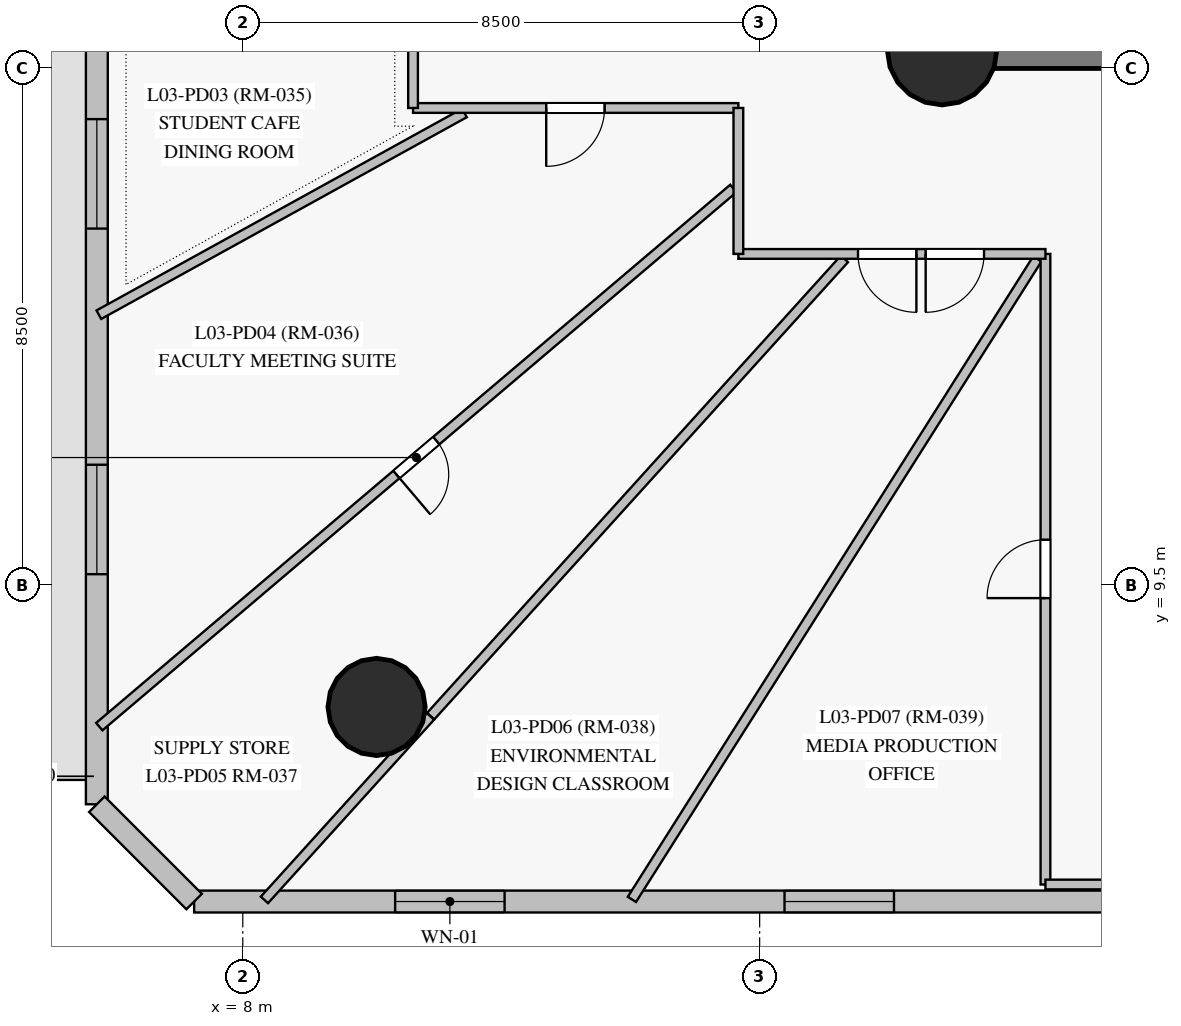
"""IFC4 building model, lengths in metres.
Left out: names, types, materials, properties, quantities, classifications, styles, units other than length and angle.
Written with IfcOpenShell. Run it as: python <this file> out.ifc"""

import sys

from ifc_helpers import new_model, si_unit, direction, frame, frame_2d, origin, origin_with_axes, origin_2d, place, context, subcontext, project, spatial, rectangle, circle, extrude, source, transform, mapped, element, fill, save


model = new_model("IFC4")
c1 = context("Model", 3, precision=1e-05, world=origin(), true_north=direction((0.0, 1.0)))
c2 = subcontext(c1, "Body", "Model", "MODEL_VIEW")
j1 = project(units=[si_unit("LENGTHUNIT", "METRE"), si_unit("PLANEANGLEUNIT", "RADIAN")], contexts=[c1])
p1 = place(None, origin())
s1 = spatial("IfcSite", under=j1, at=p1, CompositionType="ELEMENT")
p2 = place(p1, origin())
s2 = spatial("IfcBuilding", under=s1, at=p2, CompositionType="ELEMENT")
p3 = place(p2, frame((0.0, 0.0, 13.5)))
s3 = spatial("IfcBuildingStorey", under=s2, at=p3, CompositionType="ELEMENT", Elevation=13.5)
p4 = place(p3, frame((19.5, 18.3, 0.0), z_axis=(0.0, 0.0, 1.0), x_axis=(1.0, 0.0, 0.0)))
e1 = element("IfcWall", 1, at=p4, inside=s3, PredefinedType="SHEAR", context=c2, shape_type="SweptSolid", body=[
    extrude(rectangle(XDim=7.05, YDim=0.6, at=frame_2d((3.525, 0.0))), origin(), (0.0, 0.0, 1.0), 4.225),
])
p5 = place(p4, frame((4.2, 0.0, 0.0)))
e2 = element("IfcOpeningElement", 2, at=p5, cuts=e1, PredefinedType="OPENING", context=c2, shape_type="SweptSolid", body=[
    extrude(rectangle(XDim=1.4, YDim=2.2, at=frame_2d((0.7, 1.1))), frame((0.0, 0.31, 0.0), z_axis=(0.0, -1.0, 0.0), x_axis=(1.0, 0.0, 0.0)), (0.0, 0.0, 1.0), 0.62),
])
m1 = source(origin_with_axes(), c2, "Body", "SweptSolid", [
    extrude(circle(Radius=0.9, at=origin_2d()), origin(), (0.0, 0.0, 1.0), 4.5),
])
p6 = place(p3, frame((19.5, 18.3, 0.0), z_axis=(0.0, 0.0, 1.0), x_axis=(1.0, 0.0, 0.0)))
e3 = element("IfcColumn", 3, at=p6, inside=s3, PredefinedType="COLUMN", context=c2, shape_type="MappedRepresentation", body=[
    mapped(m1, transform((0.0, 0.0, 0.0), scale=1.0)),
])
m2 = source(origin_with_axes(), c2, "Body", "SweptSolid", [
    extrude(circle(Radius=0.8, at=origin_2d()), origin(), (0.0, 0.0, 1.0), 4.5),
])
p7 = place(p3, frame((10.2, 7.5, 0.0), z_axis=(0.0, 0.0, 1.0), x_axis=(1.0, 0.0, 0.0)))
e4 = element("IfcColumn", 4, at=p7, inside=s3, PredefinedType="COLUMN", context=c2, shape_type="MappedRepresentation", body=[
    mapped(m2, transform((0.0, 0.0, 0.0), scale=1.0)),
])
p8 = place(p3, frame((7.2, 4.3, 0.0), z_axis=(0.0, 0.0, 1.0), x_axis=(1.0, 0.0, 0.0)))
e5 = element("IfcWall", 5, at=p8, inside=s3, PredefinedType="SOLIDWALL", context=c2, shape_type="SweptSolid", body=[
    extrude(rectangle(XDim=46.8, YDim=0.36, at=frame_2d((23.4, 0.0))), origin(), (0.0, 0.0, 1.0), 4.225),
])
p9 = place(p8, frame((3.305, 0.0, 0.85)))
e6 = element("IfcOpeningElement", 6, at=p9, cuts=e5, PredefinedType="OPENING", context=c2, shape_type="SweptSolid", body=[
    extrude(rectangle(XDim=1.8, YDim=2.2, at=frame_2d((0.9, 1.1))), frame((0.0, 0.19, 0.0), z_axis=(0.0, -1.0, 0.0), x_axis=(1.0, 0.0, 0.0)), (0.0, 0.0, 1.0), 0.38),
])
p10 = place(p8, frame((9.709, 0.0, 0.85)))
e7 = element("IfcOpeningElement", 7, at=p10, cuts=e5, PredefinedType="OPENING", context=c2, shape_type="SweptSolid", body=[
    extrude(rectangle(XDim=1.8, YDim=2.2, at=frame_2d((0.9, 1.1))), frame((0.0, 0.19, 0.0), z_axis=(0.0, -1.0, 0.0), x_axis=(1.0, 0.0, 0.0)), (0.0, 0.0, 1.0), 0.38),
])
p11 = place(p8, frame((15.2, 0.0, 0.85)))
e8 = element("IfcOpeningElement", 8, at=p11, cuts=e5, PredefinedType="OPENING", context=c2, shape_type="SweptSolid", body=[
    extrude(rectangle(XDim=1.8, YDim=2.2, at=frame_2d((0.9, 1.1))), frame((0.0, 0.19, 0.0), z_axis=(0.0, -1.0, 0.0), x_axis=(1.0, 0.0, 0.0)), (0.0, 0.0, 1.0), 0.38),
])
p12 = place(p8, frame((18.865, 0.0, 0.85)))
e9 = element("IfcOpeningElement", 9, at=p12, cuts=e5, PredefinedType="OPENING", context=c2, shape_type="SweptSolid", body=[
    extrude(rectangle(XDim=1.8, YDim=2.2, at=frame_2d((0.9, 1.1))), frame((0.0, 0.19, 0.0), z_axis=(0.0, -1.0, 0.0), x_axis=(1.0, 0.0, 0.0)), (0.0, 0.0, 1.0), 0.38),
])
p13 = place(p8, frame((22.433, 0.0, 0.85)))
e10 = element("IfcOpeningElement", 10, at=p13, cuts=e5, PredefinedType="OPENING", context=c2, shape_type="SweptSolid", body=[
    extrude(rectangle(XDim=1.8, YDim=2.2, at=frame_2d((0.9, 1.1))), frame((0.0, 0.19, 0.0), z_axis=(0.0, -1.0, 0.0), x_axis=(1.0, 0.0, 0.0)), (0.0, 0.0, 1.0), 0.38),
])
p14 = place(p8, frame((28.606, 0.0, 0.85)))
e11 = element("IfcOpeningElement", 11, at=p14, cuts=e5, PredefinedType="OPENING", context=c2, shape_type="SweptSolid", body=[
    extrude(rectangle(XDim=1.8, YDim=2.2, at=frame_2d((0.9, 1.1))), frame((0.0, 0.19, 0.0), z_axis=(0.0, -1.0, 0.0), x_axis=(1.0, 0.0, 0.0)), (0.0, 0.0, 1.0), 0.38),
])
p15 = place(p8, frame((32.533, 0.0, 0.85)))
e12 = element("IfcOpeningElement", 12, at=p15, cuts=e5, PredefinedType="OPENING", context=c2, shape_type="SweptSolid", body=[
    extrude(rectangle(XDim=1.8, YDim=2.2, at=frame_2d((0.9, 1.1))), frame((0.0, 0.19, 0.0), z_axis=(0.0, -1.0, 0.0), x_axis=(1.0, 0.0, 0.0)), (0.0, 0.0, 1.0), 0.38),
])
p16 = place(p8, frame((36.31, 0.0, 0.85)))
e13 = element("IfcOpeningElement", 13, at=p16, cuts=e5, PredefinedType="OPENING", context=c2, shape_type="SweptSolid", body=[
    extrude(rectangle(XDim=1.8, YDim=2.2, at=frame_2d((0.9, 1.1))), frame((0.0, 0.19, 0.0), z_axis=(0.0, -1.0, 0.0), x_axis=(1.0, 0.0, 0.0)), (0.0, 0.0, 1.0), 0.38),
])
p17 = place(p8, frame((43.283, 0.0, 0.85)))
e14 = element("IfcOpeningElement", 14, at=p17, cuts=e5, PredefinedType="OPENING", context=c2, shape_type="SweptSolid", body=[
    extrude(rectangle(XDim=1.8, YDim=2.2, at=frame_2d((0.9, 1.1))), frame((0.0, 0.19, 0.0), z_axis=(0.0, -1.0, 0.0), x_axis=(1.0, 0.0, 0.0)), (0.0, 0.0, 1.0), 0.38),
])
p18 = place(p3, frame((5.6, 47.1, 0.0), z_axis=(0.0, 0.0, 1.0), x_axis=(0.0, -1.0, 0.0)))
e15 = element("IfcWall", 15, at=p18, inside=s3, PredefinedType="SOLIDWALL", context=c2, shape_type="SweptSolid", body=[
    extrude(rectangle(XDim=41.2, YDim=0.36, at=frame_2d((20.6, 0.0))), origin(), (0.0, 0.0, 1.0), 4.225),
])
p19 = place(p18, frame((1.008, 0.0, 0.85)))
e16 = element("IfcOpeningElement", 16, at=p19, cuts=e15, PredefinedType="OPENING", context=c2, shape_type="SweptSolid", body=[
    extrude(rectangle(XDim=1.8, YDim=2.2, at=frame_2d((0.9, 1.1))), frame((0.0, 0.19, 0.0), z_axis=(0.0, -1.0, 0.0), x_axis=(1.0, 0.0, 0.0)), (0.0, 0.0, 1.0), 0.38),
])
p20 = place(p18, frame((4.773, 0.0, 0.85)))
e17 = element("IfcOpeningElement", 17, at=p20, cuts=e15, PredefinedType="OPENING", context=c2, shape_type="SweptSolid", body=[
    extrude(rectangle(XDim=1.8, YDim=2.2, at=frame_2d((0.9, 1.1))), frame((0.0, 0.19, 0.0), z_axis=(0.0, -1.0, 0.0), x_axis=(1.0, 0.0, 0.0)), (0.0, 0.0, 1.0), 0.38),
])
p21 = place(p18, frame((8.381, 0.0, 0.85)))
e18 = element("IfcOpeningElement", 18, at=p21, cuts=e15, PredefinedType="OPENING", context=c2, shape_type="SweptSolid", body=[
    extrude(rectangle(XDim=1.8, YDim=2.2, at=frame_2d((0.9, 1.1))), frame((0.0, 0.19, 0.0), z_axis=(0.0, -1.0, 0.0), x_axis=(1.0, 0.0, 0.0)), (0.0, 0.0, 1.0), 0.38),
])
p22 = place(p18, frame((19.996, 0.0, 0.85)))
e19 = element("IfcOpeningElement", 19, at=p22, cuts=e15, PredefinedType="OPENING", context=c2, shape_type="SweptSolid", body=[
    extrude(rectangle(XDim=1.8, YDim=2.2, at=frame_2d((0.9, 1.1))), frame((0.0, 0.19, 0.0), z_axis=(0.0, -1.0, 0.0), x_axis=(1.0, 0.0, 0.0)), (0.0, 0.0, 1.0), 0.38),
])
p23 = place(p18, frame((25.14, 0.0, 0.85)))
e20 = element("IfcOpeningElement", 20, at=p23, cuts=e15, PredefinedType="OPENING", context=c2, shape_type="SweptSolid", body=[
    extrude(rectangle(XDim=1.8, YDim=2.2, at=frame_2d((0.9, 1.1))), frame((0.0, 0.19, 0.0), z_axis=(0.0, -1.0, 0.0), x_axis=(1.0, 0.0, 0.0)), (0.0, 0.0, 1.0), 0.38),
])
p24 = place(p18, frame((29.933, 0.0, 0.85)))
e21 = element("IfcOpeningElement", 21, at=p24, cuts=e15, PredefinedType="OPENING", context=c2, shape_type="SweptSolid", body=[
    extrude(rectangle(XDim=1.8, YDim=2.2, at=frame_2d((0.9, 1.1))), frame((0.0, 0.19, 0.0), z_axis=(0.0, -1.0, 0.0), x_axis=(1.0, 0.0, 0.0)), (0.0, 0.0, 1.0), 0.38),
])
p25 = place(p18, frame((35.617, 0.0, 0.85)))
e22 = element("IfcOpeningElement", 22, at=p25, cuts=e15, PredefinedType="OPENING", context=c2, shape_type="SweptSolid", body=[
    extrude(rectangle(XDim=1.8, YDim=2.2, at=frame_2d((0.9, 1.1))), frame((0.0, 0.19, 0.0), z_axis=(0.0, -1.0, 0.0), x_axis=(1.0, 0.0, 0.0)), (0.0, 0.0, 1.0), 0.38),
])
p26 = place(p18, frame((13.208, 0.0, 0.0)))
e23 = element("IfcOpeningElement", 23, at=p26, cuts=e15, PredefinedType="OPENING", context=c2, shape_type="SweptSolid", body=[
    extrude(rectangle(XDim=1.05, YDim=2.12, at=frame_2d((0.525, 1.06))), frame((0.0, 0.19, 0.0), z_axis=(0.0, -1.0, 0.0), x_axis=(1.0, 0.0, 0.0)), (0.0, 0.0, 1.0), 0.38),
])
p27 = place(p3, frame((5.6, 5.9, 0.0), z_axis=(0.0, 0.0, 1.0), x_axis=(0.707106781187, -0.707106781187, 0.0)))
e24 = element("IfcWall", 24, at=p27, inside=s3, PredefinedType="SOLIDWALL", context=c2, shape_type="SweptSolid", body=[
    extrude(rectangle(XDim=2.262, YDim=0.36, at=frame_2d((1.131, 0.0))), origin(), (0.0, 0.0, 1.0), 4.225),
])
p28 = place(p3, frame((16.068, 16.027, 0.0), z_axis=(0.0, 0.0, 1.0), x_axis=(-0.762407725243, -0.647096948293, 0.0)))
e25 = element("IfcWall", 25, at=p28, inside=s3, PredefinedType="PARTITIONING", context=c2, shape_type="SweptSolid", body=[
    extrude(rectangle(XDim=13.677, YDim=0.16, at=frame_2d((6.839, 0.0))), origin(), (0.0, 0.0, 1.0), 4.225),
])
p29 = place(p28, frame((6.409, 0.0, 0.0)))
e26 = element("IfcOpeningElement", 26, at=p29, cuts=e25, PredefinedType="OPENING", context=c2, shape_type="SweptSolid", body=[
    extrude(rectangle(XDim=0.86, YDim=2.04, at=frame_2d((0.43, 1.02))), frame((0.0, 0.09, 0.0), z_axis=(0.0, -1.0, 0.0), x_axis=(1.0, 0.0, 0.0)), (0.0, 0.0, 1.0), 0.18),
])
p30 = place(p3, frame((21.066, 14.868, 0.0), z_axis=(0.0, 0.0, 1.0), x_axis=(-0.534838659137, -0.844954205086, 0.0)))
e27 = element("IfcWall", 27, at=p30, inside=s3, PredefinedType="PARTITIONING", context=c2, shape_type="SweptSolid", body=[
    extrude(rectangle(XDim=12.465, YDim=0.16, at=frame_2d((6.233, 0.0))), origin(), (0.0, 0.0, 1.0), 4.225),
])
p31 = place(p3, frame((21.2, 4.58, 0.0), z_axis=(0.0, 0.0, 1.0), x_axis=(0.0, 1.0, 0.0)))
e28 = element("IfcWall", 28, at=p31, inside=s3, PredefinedType="PARTITIONING", context=c2, shape_type="SweptSolid", body=[
    extrude(rectangle(XDim=10.37, YDim=0.16, at=frame_2d((5.185, 0.0))), origin(), (0.0, 0.0, 1.0), 4.225),
])
p32 = place(p31, frame((4.71, 0.0, 0.0)))
e29 = element("IfcOpeningElement", 29, at=p32, cuts=e28, PredefinedType="OPENING", context=c2, shape_type="SweptSolid", body=[
    extrude(rectangle(XDim=0.96, YDim=2.15, at=frame_2d((0.48, 1.075))), frame((0.0, 0.09, 0.0), z_axis=(0.0, -1.0, 0.0), x_axis=(1.0, 0.0, 0.0)), (0.0, 0.0, 1.0), 0.18),
])
p33 = place(p3, frame((17.894, 14.868, 0.0), z_axis=(0.0, 0.0, 1.0), x_axis=(-0.670944212542, -0.741507831149, 0.0)))
e30 = element("IfcWall", 30, at=p33, inside=s3, PredefinedType="PARTITIONING", context=c2, shape_type="SweptSolid", body=[
    extrude(rectangle(XDim=10.141, YDim=0.16, at=frame_2d((5.07, 0.0))), origin(), (0.0, 0.0, 1.0), 4.225),
])
p34 = place(p3, frame((11.645, 17.268, 0.0), z_axis=(0.0, 0.0, 1.0), x_axis=(-0.875543975617, -0.483138434365, 0.0)))
e31 = element("IfcWall", 31, at=p34, inside=s3, PredefinedType="PARTITIONING", context=c2, shape_type="SweptSolid", body=[
    extrude(rectangle(XDim=6.867, YDim=0.16, at=frame_2d((3.434, 0.0))), origin(), (0.0, 0.0, 1.0), 4.225),
])
p35 = place(p3, frame((16.15, 17.35, 0.0), z_axis=(0.0, 0.0, 1.0), x_axis=(-1.0, 0.0, 0.0)))
e32 = element("IfcWall", 32, at=p35, inside=s3, PredefinedType="PARTITIONING", context=c2, shape_type="SweptSolid", body=[
    extrude(rectangle(XDim=5.35, YDim=0.16, at=frame_2d((2.675, 0.0))), origin(), (0.0, 0.0, 1.0), 4.225),
])
p36 = place(p35, frame((2.2, 0.0, 0.0)))
e33 = element("IfcOpeningElement", 33, at=p36, cuts=e32, PredefinedType="OPENING", context=c2, shape_type="SweptSolid", body=[
    extrude(rectangle(XDim=0.96, YDim=2.15, at=frame_2d((0.48, 1.075))), frame((0.0, 0.09, 0.0), z_axis=(0.0, -1.0, 0.0), x_axis=(1.0, 0.0, 0.0)), (0.0, 0.0, 1.0), 0.18),
])
p37 = place(p3, frame((21.2, 14.95, 0.0), z_axis=(0.0, 0.0, 1.0), x_axis=(-1.0, 0.0, 0.0)))
e34 = element("IfcWall", 34, at=p37, inside=s3, PredefinedType="PARTITIONING", context=c2, shape_type="SweptSolid", body=[
    extrude(rectangle(XDim=5.05, YDim=0.16, at=frame_2d((2.525, 0.0))), origin(), (0.0, 0.0, 1.0), 4.225),
])
p38 = place(p37, frame((2.123, 0.0, 0.0)))
e35 = element("IfcOpeningElement", 35, at=p38, cuts=e34, PredefinedType="OPENING", context=c2, shape_type="SweptSolid", body=[
    extrude(rectangle(XDim=0.96, YDim=2.15, at=frame_2d((0.48, 1.075))), frame((0.0, 0.09, 0.0), z_axis=(0.0, -1.0, 0.0), x_axis=(1.0, 0.0, 0.0)), (0.0, 0.0, 1.0), 0.18),
])
p39 = place(p37, frame((1.01, 0.0, 0.0)))
e36 = element("IfcOpeningElement", 36, at=p39, cuts=e34, PredefinedType="OPENING", context=c2, shape_type="SweptSolid", body=[
    extrude(rectangle(XDim=0.96, YDim=2.15, at=frame_2d((0.48, 1.075))), frame((0.0, 0.09, 0.0), z_axis=(0.0, -1.0, 0.0), x_axis=(1.0, 0.0, 0.0)), (0.0, 0.0, 1.0), 0.18),
])
p40 = place(p3, frame((25.4, 4.58, 0.0), z_axis=(0.0, 0.0, 1.0), x_axis=(-1.0, 0.0, 0.0)))
e37 = element("IfcWall", 37, at=p40, inside=s3, PredefinedType="PARTITIONING", context=c2, shape_type="SweptSolid", body=[
    extrude(rectangle(XDim=4.2, YDim=0.16, at=frame_2d((2.1, 0.0))), origin(), (0.0, 0.0, 1.0), 4.225),
])
p41 = place(p3, frame((10.8, 17.35, 0.0), z_axis=(0.0, 0.0, 1.0), x_axis=(0.0, 1.0, 0.0)))
e38 = element("IfcWall", 38, at=p41, inside=s3, PredefinedType="PARTITIONING", context=c2, shape_type="SweptSolid", body=[
    extrude(rectangle(XDim=3.07, YDim=0.16, at=frame_2d((1.535, 0.0))), origin(), (0.0, 0.0, 1.0), 3.275),
])
p42 = place(p41, frame((1.06, 0.0, 0.0)))
e39 = element("IfcOpeningElement", 39, at=p42, cuts=e38, PredefinedType="OPENING", context=c2, shape_type="SweptSolid", body=[
    extrude(rectangle(XDim=0.96, YDim=2.15, at=frame_2d((0.48, 1.075))), frame((0.0, 0.09, 0.0), z_axis=(0.0, -1.0, 0.0), x_axis=(1.0, 0.0, 0.0)), (0.0, 0.0, 1.0), 0.18),
])
p43 = place(p3, frame((11.087, 7.345, 0.0), z_axis=(0.0, 0.0, 1.0), x_axis=(-0.670954161955, -0.741498828425, 0.0)))
e40 = element("IfcWall", 40, at=p43, inside=s3, PredefinedType="PARTITIONING", context=c2, shape_type="SweptSolid", body=[
    extrude(rectangle(XDim=4.07, YDim=0.16, at=frame_2d((2.035, 0.0))), origin(), (0.0, 0.0, 1.0), 4.225),
])
p44 = place(p3, frame((16.15, 14.95, 0.0), z_axis=(0.0, 0.0, 1.0), x_axis=(0.0, 1.0, 0.0)))
e41 = element("IfcWall", 41, at=p44, inside=s3, PredefinedType="PARTITIONING", context=c2, shape_type="SweptSolid", body=[
    extrude(rectangle(XDim=2.4, YDim=0.16, at=frame_2d((1.2, 0.0))), origin(), (0.0, 0.0, 1.0), 3.275),
])
m3 = source(origin_with_axes(), c2, "Body", "SweptSolid", [
    extrude(rectangle(XDim=1.8, YDim=2.2, at=frame_2d((0.9, 1.1))), frame((0.0, 0.03, 0.0), z_axis=(0.0, -1.0, 0.0), x_axis=(1.0, 0.0, 0.0)), (0.0, 0.0, 1.0), 0.06),
])
p45 = place(p9, origin())
e42 = element("IfcWindow", 42, at=p45, inside=s3, PartitioningType="SINGLE_PANEL", PredefinedType="WINDOW", context=c2, shape_type="MappedRepresentation", body=[
    mapped(m3, transform((0.0, 0.0, 0.0), scale=1.0)),
])
fill(e6, e42)
p46 = place(p10, origin())
e43 = element("IfcWindow", 43, at=p46, inside=s3, PartitioningType="SINGLE_PANEL", PredefinedType="WINDOW", context=c2, shape_type="MappedRepresentation", body=[
    mapped(m3, transform((0.0, 0.0, 0.0), scale=1.0)),
])
fill(e7, e43)
p47 = place(p24, origin())
e44 = element("IfcWindow", 44, at=p47, inside=s3, PartitioningType="SINGLE_PANEL", PredefinedType="WINDOW", context=c2, shape_type="MappedRepresentation", body=[
    mapped(m3, transform((0.0, 0.0, 0.0), scale=1.0)),
])
fill(e21, e44)
p48 = place(p25, origin())
e45 = element("IfcWindow", 45, at=p48, inside=s3, PartitioningType="SINGLE_PANEL", PredefinedType="WINDOW", context=c2, shape_type="MappedRepresentation", body=[
    mapped(m3, transform((0.0, 0.0, 0.0), scale=1.0)),
])
fill(e22, e45)
m4 = source(origin_with_axes(), c2, "Body", "SweptSolid", [
    extrude(rectangle(XDim=0.96, YDim=2.15, at=frame_2d((0.48, 1.075))), frame((0.0, 0.025, 0.0), z_axis=(0.0, -1.0, 0.0), x_axis=(1.0, 0.0, 0.0)), (0.0, 0.0, 1.0), 0.05),
])
p49 = place(p36, origin())
e46 = element("IfcDoor", 46, at=p49, inside=s3, OperationType="SINGLE_SWING_RIGHT", PredefinedType="DOOR", context=c2, shape_type="MappedRepresentation", body=[
    mapped(m4, transform((0.0, 0.0, 0.0), scale=1.0)),
])
fill(e33, e46)
p50 = place(p38, origin())
e47 = element("IfcDoor", 47, at=p50, inside=s3, OperationType="SINGLE_SWING_LEFT", PredefinedType="DOOR", context=c2, shape_type="MappedRepresentation", body=[
    mapped(m4, transform((0.0, 0.0, 0.0), scale=1.0)),
])
fill(e35, e47)
p51 = place(p39, origin())
e48 = element("IfcDoor", 48, at=p51, inside=s3, OperationType="SINGLE_SWING_RIGHT", PredefinedType="DOOR", context=c2, shape_type="MappedRepresentation", body=[
    mapped(m4, transform((0.0, 0.0, 0.0), scale=1.0)),
])
fill(e36, e48)
p52 = place(p32, origin())
e49 = element("IfcDoor", 49, at=p52, inside=s3, OperationType="SINGLE_SWING_LEFT", PredefinedType="DOOR", context=c2, shape_type="MappedRepresentation", body=[
    mapped(m4, transform((0.0, 0.0, 0.0), scale=1.0)),
])
fill(e29, e49)
m5 = source(origin_with_axes(), c2, "Body", "SweptSolid", [
    extrude(rectangle(XDim=0.86, YDim=2.04, at=frame_2d((0.43, 1.02))), frame((0.0, 0.025, 0.0), z_axis=(0.0, -1.0, 0.0), x_axis=(1.0, 0.0, 0.0)), (0.0, 0.0, 1.0), 0.05),
])
p53 = place(p29, origin())
e50 = element("IfcDoor", 50, at=p53, inside=s3, OperationType="SINGLE_SWING_RIGHT", PredefinedType="DOOR", context=c2, shape_type="MappedRepresentation", body=[
    mapped(m5, transform((0.0, 0.0, 0.0), scale=1.0)),
])
fill(e26, e50)
save(model, sys.argv[1])
